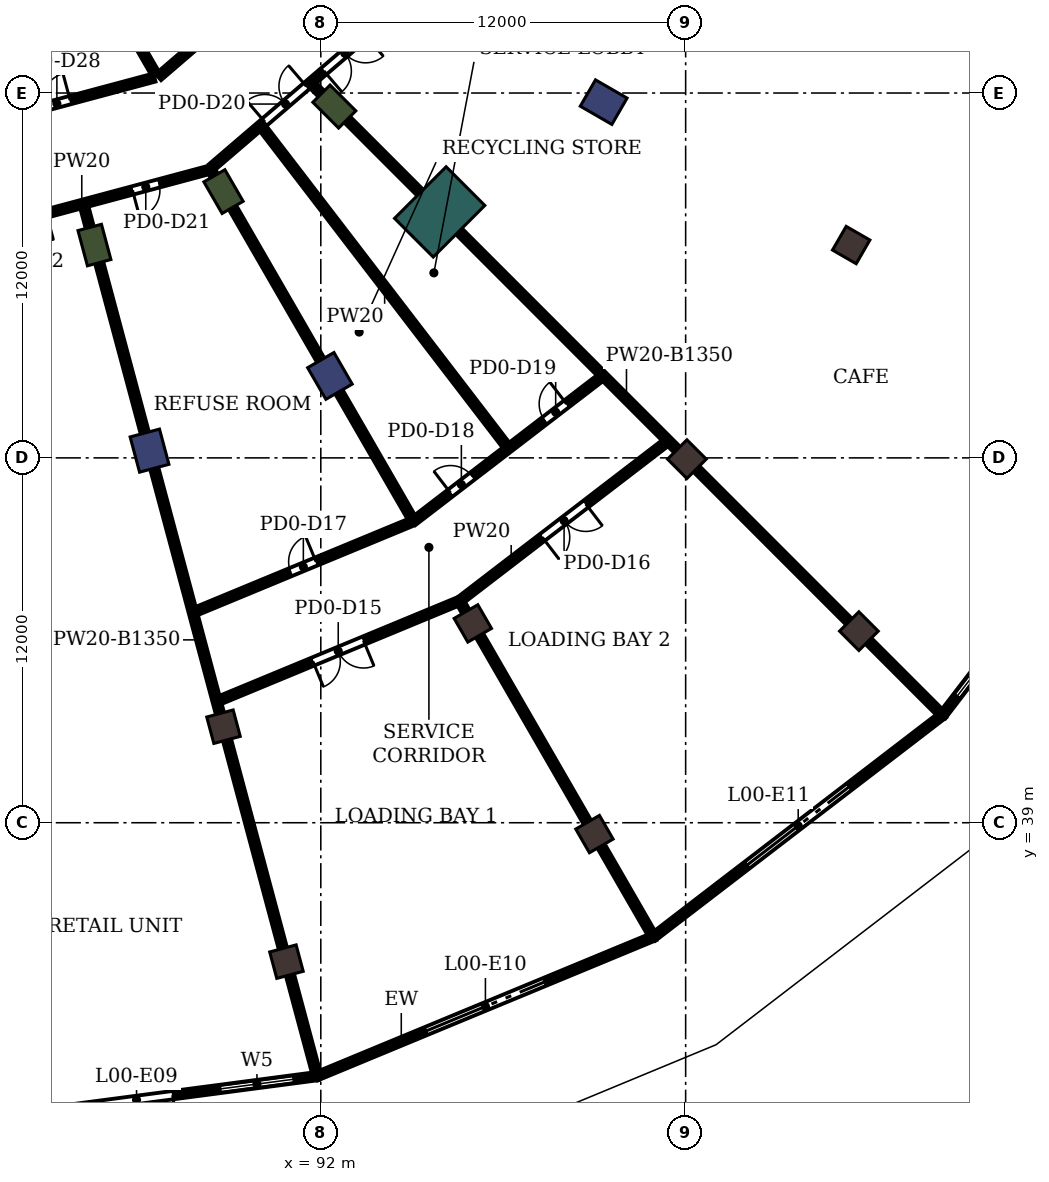
"""IFC4 building model, lengths in metres.
Left out: names, types, materials, properties, quantities, classifications, styles, units other than length and angle.
Written with IfcOpenShell. Run it as: python <this file> out.ifc"""

import sys

from ifc_helpers import new_model, si_unit, direction, frame, frame_2d, origin, origin_2d, place, context, subcontext, project, spatial, rectangle, extrude, element, fill, save


model = new_model("IFC4")
c1 = context("Model", 3, precision=1e-05, world=origin(), true_north=direction((0.0, 1.0)))
c2 = subcontext(c1, "Body", "Model", "MODEL_VIEW")
j1 = project(units=[si_unit("LENGTHUNIT", "METRE"), si_unit("PLANEANGLEUNIT", "RADIAN")], contexts=[c1])
p1 = place(None, origin())
s1 = spatial("IfcSite", under=j1, at=p1, CompositionType="ELEMENT")
p2 = place(p1, origin())
s2 = spatial("IfcBuilding", under=s1, at=p2, CompositionType="ELEMENT")
p3 = place(p2, origin())
s3 = spatial("IfcBuildingStorey", under=s2, at=p3, CompositionType="ELEMENT", Elevation=0.0)
for number, where, z_axis, x_axis in (
    (1, (90.87, 34.431, 0.0), (0.0, 0.0, 1.0), (0.259, -0.966, 0.0)),
    (2, (101.0, 38.627, 0.0), (0.0, 0.0, 1.0), (0.5, -0.866, 0.0)),
    (3, (109.698, 45.302, 0.0), (0.0, 0.0, 1.0), (0.707, -0.707, 0.0)),
    (4, (88.8, 42.158, 0.0), (0.0, 0.0, 1.0), (0.259, -0.966, 0.0)),
    (5, (97.0, 45.555, 0.0), (0.0, 0.0, 1.0), (0.5, -0.866, 0.0)),
    (6, (104.042, 50.958, 0.0), (0.0, 0.0, 1.0), (0.707, -0.707, 0.0)),
    (7, (109.445, 58.0, 0.0), (0.0, 0.0, 1.0), (0.866, -0.5, 0.0)),
):
    element("IfcColumn", number, at=place(p3, frame(where, z_axis=z_axis, x_axis=x_axis)), inside=s3, PredefinedType="COLUMN", context=c2, shape_type="SweptSolid", body=[
        extrude(rectangle(XDim=0.9, YDim=0.9, at=origin_2d()), origin(), (0.0, 0.0, 1.0), 7.0),
    ])
for number, where, z_axis, x_axis in (
    (8, (86.367, 51.238, 0.0), (0.0, 0.0, 1.0), (0.259, -0.966, 0.0)),
    (9, (92.3, 53.696, 0.0), (0.0, 0.0, 1.0), (0.5, -0.866, 0.0)),
    (10, (101.304, 62.7, 0.0), (0.0, 0.0, 1.0), (0.866, -0.5, 0.0)),
):
    element("IfcColumn", number, at=place(p3, frame(where, z_axis=z_axis, x_axis=x_axis)), inside=s3, PredefinedType="COLUMN", context=c2, shape_type="SweptSolid", body=[
        extrude(rectangle(XDim=1.2, YDim=1.0, at=origin_2d()), origin(), (0.0, 0.0, 1.0), 7.0),
    ])
for number, where, z_axis, x_axis in (
    (11, (84.555, 58.0, 0.0), (0.0, 0.0, 1.0), (0.259, -0.966, 0.0)),
    (12, (88.8, 59.758, 0.0), (0.0, 0.0, 1.0), (0.5, -0.866, 0.0)),
    (13, (92.445, 62.555, 0.0), (0.0, 0.0, 1.0), (0.707, -0.707, 0.0)),
):
    element("IfcColumn", number, at=place(p3, frame(where, z_axis=z_axis, x_axis=x_axis)), inside=s3, PredefinedType="COLUMN", context=c2, shape_type="SweptSolid", body=[
        extrude(rectangle(XDim=1.2, YDim=0.8, at=origin_2d()), origin(), (0.0, 0.0, 1.0), 7.0),
    ])
p4 = place(p3, frame((95.91, 59.09, 0.0), z_axis=(0.0, 0.0, 1.0), x_axis=(0.707106781187, -0.707106781187, 0.0)))
e14 = element("IfcColumn", 14, at=p4, inside=s3, PredefinedType="COLUMN", context=c2, shape_type="SweptSolid", body=[
    extrude(rectangle(XDim=1.8, YDim=2.4, at=origin_2d()), origin(), (0.0, 0.0, 1.0), 7.0),
])
p5 = place(p3, frame((80.0, 29.101, 0.0), z_axis=(0.0, 0.0, 1.0), x_axis=(0.991445069361, 0.130524612391, 0.0)))
e15 = element("IfcWall", 15, at=p5, inside=s3, PredefinedType="NOTDEFINED", context=c2, shape_type="SweptSolid", body=[
    extrude(rectangle(XDim=11.982, YDim=0.2, at=frame_2d((5.991, 0.0))), origin(), (0.0, 0.0, 1.0), 7.0),
])
p6 = place(p5, frame((0.797, 0.0, 0.9)))
e16 = element("IfcOpeningElement", 16, at=p6, cuts=e15, PredefinedType="OPENING", context=c2, shape_type="SweptSolid", body=[
    extrude(rectangle(XDim=2.4, YDim=3.6, at=frame_2d((1.2, 1.8))), frame((0.0, 0.11, 0.0), z_axis=(0.0, -1.0, 0.0), x_axis=(1.0, 0.0, 0.0)), (0.0, 0.0, 1.0), 0.22),
])
p7 = place(p5, frame((4.791, 0.0, 0.0)))
e17 = element("IfcOpeningElement", 17, at=p7, cuts=e15, PredefinedType="OPENING", context=c2, shape_type="SweptSolid", body=[
    extrude(rectangle(XDim=2.4, YDim=2.7, at=frame_2d((1.2, 1.35))), frame((0.0, 0.11, 0.0), z_axis=(0.0, -1.0, 0.0), x_axis=(1.0, 0.0, 0.0)), (0.0, 0.0, 1.0), 0.22),
])
p8 = place(p5, frame((8.785, 0.0, 0.9)))
e18 = element("IfcOpeningElement", 18, at=p8, cuts=e15, PredefinedType="OPENING", context=c2, shape_type="SweptSolid", body=[
    extrude(rectangle(XDim=2.4, YDim=3.6, at=frame_2d((1.2, 1.8))), frame((0.0, 0.11, 0.0), z_axis=(0.0, -1.0, 0.0), x_axis=(1.0, 0.0, 0.0)), (0.0, 0.0, 1.0), 0.22),
])
p9 = place(p3, frame((91.88, 30.665, 0.0), z_axis=(0.0, 0.0, 1.0), x_axis=(0.923874283273, 0.382696104901, 0.0)))
e19 = element("IfcWall", 19, at=p9, inside=s3, PredefinedType="NOTDEFINED", context=c2, shape_type="SweptSolid", body=[
    extrude(rectangle(XDim=11.982, YDim=0.2, at=frame_2d((5.991, 0.0))), origin(), (0.0, 0.0, 1.0), 7.0),
])
p10 = place(p9, frame((3.891, 0.0, 0.0)))
e20 = element("IfcOpeningElement", 20, at=p10, cuts=e19, PredefinedType="OPENING", context=c2, shape_type="SweptSolid", body=[
    extrude(rectangle(XDim=4.2, YDim=4.5, at=frame_2d((2.1, 2.25))), frame((0.0, 0.11, 0.0), z_axis=(0.0, -1.0, 0.0), x_axis=(1.0, 0.0, 0.0)), (0.0, 0.0, 1.0), 0.22),
])
p11 = place(p3, frame((102.949, 35.25, 0.0), z_axis=(0.0, 0.0, 1.0), x_axis=(0.793357384068, 0.608756159021, 0.0)))
e21 = element("IfcWall", 21, at=p11, inside=s3, PredefinedType="NOTDEFINED", context=c2, shape_type="SweptSolid", body=[
    extrude(rectangle(XDim=11.982, YDim=0.2, at=frame_2d((5.991, 0.0))), origin(), (0.0, 0.0, 1.0), 7.0),
])
p12 = place(p11, frame((3.891, 0.0, 0.0)))
e22 = element("IfcOpeningElement", 22, at=p12, cuts=e21, PredefinedType="OPENING", context=c2, shape_type="SweptSolid", body=[
    extrude(rectangle(XDim=4.2, YDim=4.5, at=frame_2d((2.1, 2.25))), frame((0.0, 0.11, 0.0), z_axis=(0.0, -1.0, 0.0), x_axis=(1.0, 0.0, 0.0)), (0.0, 0.0, 1.0), 0.22),
])
p13 = place(p3, frame((112.456, 42.544, 0.0), z_axis=(0.0, 0.0, 1.0), x_axis=(0.608756159021, 0.793357384068, 0.0)))
e23 = element("IfcWall", 23, at=p13, inside=s3, PredefinedType="NOTDEFINED", context=c2, shape_type="SweptSolid", body=[
    extrude(rectangle(XDim=11.982, YDim=0.2, at=frame_2d((5.991, 0.0))), origin(), (0.0, 0.0, 1.0), 7.0),
])
p14 = place(p13, frame((0.797, 0.0, 0.9)))
e24 = element("IfcOpeningElement", 24, at=p14, cuts=e23, PredefinedType="OPENING", context=c2, shape_type="SweptSolid", body=[
    extrude(rectangle(XDim=2.4, YDim=3.6, at=frame_2d((1.2, 1.8))), frame((0.0, 0.11, 0.0), z_axis=(0.0, -1.0, 0.0), x_axis=(1.0, 0.0, 0.0)), (0.0, 0.0, 1.0), 0.22),
])
p15 = place(p13, frame((4.791, 0.0, 0.0)))
e25 = element("IfcOpeningElement", 25, at=p15, cuts=e23, PredefinedType="OPENING", context=c2, shape_type="SweptSolid", body=[
    extrude(rectangle(XDim=2.4, YDim=2.7, at=frame_2d((1.2, 1.35))), frame((0.0, 0.11, 0.0), z_axis=(0.0, -1.0, 0.0), x_axis=(1.0, 0.0, 0.0)), (0.0, 0.0, 1.0), 0.22),
])
p16 = place(p13, frame((8.785, 0.0, 0.9)))
e26 = element("IfcOpeningElement", 26, at=p16, cuts=e23, PredefinedType="OPENING", context=c2, shape_type="SweptSolid", body=[
    extrude(rectangle(XDim=2.4, YDim=3.6, at=frame_2d((1.2, 1.8))), frame((0.0, 0.11, 0.0), z_axis=(0.0, -1.0, 0.0), x_axis=(1.0, 0.0, 0.0)), (0.0, 0.0, 1.0), 0.22),
])
p17 = place(p3, frame((80.0, 58.24, 0.0), z_axis=(0.0, 0.0, 1.0), x_axis=(0.965929228495, 0.258806347564, 0.0)))
e27 = element("IfcWall", 27, at=p17, inside=s3, PredefinedType="PARTITIONING", context=c2, shape_type="SweptSolid", body=[
    extrude(rectangle(XDim=8.568, YDim=0.2, at=frame_2d((4.284, 0.0))), origin(), (0.0, 0.0, 1.0), 6.55),
])
p18 = place(p17, frame((6.013, 0.0, 0.0)))
e28 = element("IfcOpeningElement", 28, at=p18, cuts=e27, PredefinedType="OPENING", context=c2, shape_type="SweptSolid", body=[
    extrude(rectangle(XDim=0.9, YDim=2.1, at=frame_2d((0.45, 1.05))), frame((0.0, 0.11, 0.0), z_axis=(0.0, -1.0, 0.0), x_axis=(1.0, 0.0, 0.0)), (0.0, 0.0, 1.0), 0.22),
])
p19 = place(p17, frame((1.279, 0.0, 0.0)))
e29 = element("IfcOpeningElement", 29, at=p19, cuts=e27, PredefinedType="OPENING", context=c2, shape_type="SweptSolid", body=[
    extrude(rectangle(XDim=1.8, YDim=2.1, at=frame_2d((0.9, 1.05))), frame((0.0, 0.11, 0.0), z_axis=(0.0, -1.0, 0.0), x_axis=(1.0, 0.0, 0.0)), (0.0, 0.0, 1.0), 0.22),
])
p20 = place(p3, frame((80.0, 61.76, 0.0), z_axis=(0.0, 0.0, 1.0), x_axis=(0.965932810031, 0.258792980017, 0.0)))
e30 = element("IfcWall", 30, at=p20, inside=s3, PredefinedType="PARTITIONING", context=c2, shape_type="SweptSolid", body=[
    extrude(rectangle(XDim=6.721, YDim=0.2, at=frame_2d((3.36, 0.0))), origin(), (0.0, 0.0, 1.0), 6.55),
])
p21 = place(p20, frame((2.987, 0.0, 0.0)))
e31 = element("IfcOpeningElement", 31, at=p21, cuts=e30, PredefinedType="OPENING", context=c2, shape_type="SweptSolid", body=[
    extrude(rectangle(XDim=0.9, YDim=2.1, at=frame_2d((0.45, 1.05))), frame((0.0, 0.11, 0.0), z_axis=(0.0, -1.0, 0.0), x_axis=(1.0, 0.0, 0.0)), (0.0, 0.0, 1.0), 0.22),
])
p22 = place(p3, frame((83.847, 68.332, 0.0), z_axis=(0.0, 0.0, 1.0), x_axis=(0.499867183387, -0.866102071914, 0.0)))
e32 = element("IfcWall", 32, at=p22, inside=s3, PredefinedType="PARTITIONING", context=c2, shape_type="SweptSolid", body=[
    extrude(rectangle(XDim=5.452, YDim=0.2, at=frame_2d((2.726, 0.0))), origin(), (0.0, 0.0, 1.0), 6.55),
])
p23 = place(p3, frame((84.216, 59.265, 0.0), z_axis=(0.0, 0.0, 1.0), x_axis=(0.258760898943, -0.96594140463, 0.0)))
e33 = element("IfcWall", 33, at=p23, inside=s3, PredefinedType="PARTITIONING", context=c2, shape_type="SweptSolid", body=[
    extrude(rectangle(XDim=29.508, YDim=0.2, at=frame_2d((14.754, 0.0))), origin(), (0.0, 0.0, 1.0), 5.65),
])
p24 = place(p3, frame((86.685, 63.551, 0.0), z_axis=(0.0, 0.0, 1.0), x_axis=(0.758049900748, 0.652196556244, 0.0)))
e34 = element("IfcWall", 34, at=p24, inside=s3, PredefinedType="PARTITIONING", context=c2, shape_type="SweptSolid", body=[
    extrude(rectangle(XDim=4.675, YDim=0.2, at=frame_2d((2.337, 0.0))), origin(), (0.0, 0.0, 1.0), 6.55),
])
p25 = place(p24, frame((1.837, 0.0, 0.0)))
e35 = element("IfcOpeningElement", 35, at=p25, cuts=e34, PredefinedType="OPENING", context=c2, shape_type="SweptSolid", body=[
    extrude(rectangle(XDim=1.0, YDim=2.1, at=frame_2d((0.5, 1.05))), frame((0.0, 0.11, 0.0), z_axis=(0.0, -1.0, 0.0), x_axis=(1.0, 0.0, 0.0)), (0.0, 0.0, 1.0), 0.22),
])
p26 = place(p3, frame((87.896, 45.954, 0.0), z_axis=(0.0, 0.0, 1.0), x_axis=(0.923937266852, 0.382544019587, 0.0)))
e36 = element("IfcWall", 36, at=p26, inside=s3, PredefinedType="PARTITIONING", context=c2, shape_type="SweptSolid", body=[
    extrude(rectangle(XDim=7.628, YDim=0.2, at=frame_2d((3.814, 0.0))), origin(), (0.0, 0.0, 1.0), 6.55),
])
p27 = place(p26, frame((3.371, 0.0, 0.0)))
e37 = element("IfcOpeningElement", 37, at=p27, cuts=e36, PredefinedType="OPENING", context=c2, shape_type="SweptSolid", body=[
    extrude(rectangle(XDim=0.9, YDim=2.1, at=frame_2d((0.45, 1.05))), frame((0.0, 0.11, 0.0), z_axis=(0.0, -1.0, 0.0), x_axis=(1.0, 0.0, 0.0)), (0.0, 0.0, 1.0), 0.22),
])
p28 = place(p3, frame((88.434, 60.575, 0.0), z_axis=(0.0, 0.0, 1.0), x_axis=(0.759266619151, 0.650779687024, 0.0)))
e38 = element("IfcWall", 38, at=p28, inside=s3, PredefinedType="PARTITIONING", context=c2, shape_type="SweptSolid", body=[
    extrude(rectangle(XDim=6.882, YDim=0.2, at=frame_2d((3.441, 0.0))), origin(), (0.0, 0.0, 1.0), 6.55),
])
p29 = place(p28, frame((4.835, 0.0, 0.0)))
e39 = element("IfcOpeningElement", 39, at=p29, cuts=e38, PredefinedType="OPENING", context=c2, shape_type="SweptSolid", body=[
    extrude(rectangle(XDim=1.8, YDim=2.1, at=frame_2d((0.9, 1.05))), frame((0.0, 0.11, 0.0), z_axis=(0.0, -1.0, 0.0), x_axis=(1.0, 0.0, 0.0)), (0.0, 0.0, 1.0), 0.22),
])
p30 = place(p28, frame((2.269, 0.0, 0.0)))
e40 = element("IfcOpeningElement", 40, at=p30, cuts=e38, PredefinedType="OPENING", context=c2, shape_type="SweptSolid", body=[
    extrude(rectangle(XDim=1.8, YDim=2.1, at=frame_2d((0.9, 1.05))), frame((0.0, 0.11, 0.0), z_axis=(0.0, -1.0, 0.0), x_axis=(1.0, 0.0, 0.0)), (0.0, 0.0, 1.0), 0.22),
])
p31 = place(p3, frame((88.362, 60.509, 0.0), z_axis=(0.0, 0.0, 1.0), x_axis=(0.499842399886, -0.866116375134, 0.0)))
e41 = element("IfcWall", 41, at=p31, inside=s3, PredefinedType="PARTITIONING", context=c2, shape_type="SweptSolid", body=[
    extrude(rectangle(XDim=13.274, YDim=0.2, at=frame_2d((6.637, 0.0))), origin(), (0.0, 0.0, 1.0), 5.65),
])
p32 = place(p3, frame((88.679, 43.031, 0.0), z_axis=(0.0, 0.0, 1.0), x_axis=(0.923882727898, 0.382675717927, 0.0)))
e42 = element("IfcWall", 42, at=p32, inside=s3, PredefinedType="PARTITIONING", context=c2, shape_type="SweptSolid", body=[
    extrude(rectangle(XDim=8.432, YDim=0.2, at=frame_2d((4.216, 0.0))), origin(), (0.0, 0.0, 1.0), 6.55),
])
p33 = place(p32, frame((3.316, 0.0, 0.0)))
e43 = element("IfcOpeningElement", 43, at=p33, cuts=e42, PredefinedType="OPENING", context=c2, shape_type="SweptSolid", body=[
    extrude(rectangle(XDim=1.8, YDim=2.1, at=frame_2d((0.9, 1.05))), frame((0.0, 0.11, 0.0), z_axis=(0.0, -1.0, 0.0), x_axis=(1.0, 0.0, 0.0)), (0.0, 0.0, 1.0), 0.22),
])
p34 = place(p3, frame((90.088, 61.849, 0.0), z_axis=(0.0, 0.0, 1.0), x_axis=(0.608726617775, -0.793380050677, 0.0)))
e44 = element("IfcWall", 44, at=p34, inside=s3, PredefinedType="PARTITIONING", context=c2, shape_type="SweptSolid", body=[
    extrude(rectangle(XDim=13.182, YDim=0.2, at=frame_2d((6.591, 0.0))), origin(), (0.0, 0.0, 1.0), 6.55),
])
p35 = place(p3, frame((91.732, 63.263, 0.0), z_axis=(0.0, 0.0, 1.0), x_axis=(0.706939557171, -0.707273965665, 0.0)))
e45 = element("IfcWall", 45, at=p35, inside=s3, PredefinedType="PARTITIONING", context=c2, shape_type="SweptSolid", body=[
    extrude(rectangle(XDim=29.203, YDim=0.2, at=frame_2d((14.601, 0.0))), origin(), (0.0, 0.0, 1.0), 5.65),
])
p36 = place(p3, frame((95.058, 48.92, 0.0), z_axis=(0.0, 0.0, 1.0), x_axis=(0.793254408542, 0.608890337687, 0.0)))
e46 = element("IfcWall", 46, at=p36, inside=s3, PredefinedType="PARTITIONING", context=c2, shape_type="SweptSolid", body=[
    extrude(rectangle(XDim=7.74, YDim=0.2, at=frame_2d((3.87, 0.0))), origin(), (0.0, 0.0, 1.0), 6.55),
])
p37 = place(p36, frame((1.523, 0.0, 0.0)))
e47 = element("IfcOpeningElement", 47, at=p37, cuts=e46, PredefinedType="OPENING", context=c2, shape_type="SweptSolid", body=[
    extrude(rectangle(XDim=0.9, YDim=2.1, at=frame_2d((0.45, 1.05))), frame((0.0, 0.11, 0.0), z_axis=(0.0, -1.0, 0.0), x_axis=(1.0, 0.0, 0.0)), (0.0, 0.0, 1.0), 0.22),
])
p38 = place(p36, frame((5.434, 0.0, 0.0)))
e48 = element("IfcOpeningElement", 48, at=p38, cuts=e46, PredefinedType="OPENING", context=c2, shape_type="SweptSolid", body=[
    extrude(rectangle(XDim=0.9, YDim=2.1, at=frame_2d((0.45, 1.05))), frame((0.0, 0.11, 0.0), z_axis=(0.0, -1.0, 0.0), x_axis=(1.0, 0.0, 0.0)), (0.0, 0.0, 1.0), 0.22),
])
p39 = place(p3, frame((96.614, 46.21, 0.0), z_axis=(0.0, 0.0, 1.0), x_axis=(0.499854846894, -0.866109191752, 0.0)))
e49 = element("IfcWall", 49, at=p39, inside=s3, PredefinedType="PARTITIONING", context=c2, shape_type="SweptSolid", body=[
    extrude(rectangle(XDim=12.558, YDim=0.2, at=frame_2d((6.279, 0.0))), origin(), (0.0, 0.0, 1.0), 5.65),
])
p40 = place(p3, frame((96.57, 46.3, 0.0), z_axis=(0.0, 0.0, 1.0), x_axis=(0.793368149713, 0.608742128509, 0.0)))
e50 = element("IfcWall", 50, at=p40, inside=s3, PredefinedType="PARTITIONING", context=c2, shape_type="SweptSolid", body=[
    extrude(rectangle(XDim=8.531, YDim=0.2, at=frame_2d((4.265, 0.0))), origin(), (0.0, 0.0, 1.0), 6.55),
])
p41 = place(p40, frame((3.425, 0.0, 0.0)))
e51 = element("IfcOpeningElement", 51, at=p41, cuts=e50, PredefinedType="OPENING", context=c2, shape_type="SweptSolid", body=[
    extrude(rectangle(XDim=1.8, YDim=2.1, at=frame_2d((0.9, 1.05))), frame((0.0, 0.11, 0.0), z_axis=(0.0, -1.0, 0.0), x_axis=(1.0, 0.0, 0.0)), (0.0, 0.0, 1.0), 0.22),
])
p42 = place(p7, frame((2.4, 0.0, 0.0), z_axis=(0.0, 0.0, 1.0), x_axis=(-1.0, 0.0, 0.0)))
e52 = element("IfcDoor", 52, at=p42, inside=s3, OperationType="DOUBLE_DOOR_SINGLE_SWING", PredefinedType="DOOR", context=c2, shape_type="SweptSolid", body=[
    extrude(rectangle(XDim=2.4, YDim=2.7, at=frame_2d((1.2, 1.35))), frame((0.0, 0.025, 0.0), z_axis=(0.0, -1.0, 0.0), x_axis=(1.0, 0.0, 0.0)), (0.0, 0.0, 1.0), 0.05),
])
fill(e17, e52)
p43 = place(p8, origin())
e53 = element("IfcWindow", 53, at=p43, inside=s3, PartitioningType="SINGLE_PANEL", PredefinedType="WINDOW", context=c2, shape_type="SweptSolid", body=[
    extrude(rectangle(XDim=2.4, YDim=3.6, at=frame_2d((1.2, 1.8))), frame((0.0, 0.03, 0.0), z_axis=(0.0, -1.0, 0.0), x_axis=(1.0, 0.0, 0.0)), (0.0, 0.0, 1.0), 0.06),
])
fill(e18, e53)
p44 = place(p10, origin())
e54 = element("IfcDoor", 54, at=p44, inside=s3, OperationType="ROLLINGUP", PredefinedType="DOOR", context=c2, shape_type="SweptSolid", body=[
    extrude(rectangle(XDim=4.2, YDim=4.5, at=frame_2d((2.1, 2.25))), frame((0.0, 0.025, 0.0), z_axis=(0.0, -1.0, 0.0), x_axis=(1.0, 0.0, 0.0)), (0.0, 0.0, 1.0), 0.05),
])
fill(e20, e54)
p45 = place(p12, origin())
e55 = element("IfcDoor", 55, at=p45, inside=s3, OperationType="ROLLINGUP", PredefinedType="DOOR", context=c2, shape_type="SweptSolid", body=[
    extrude(rectangle(XDim=4.2, YDim=4.5, at=frame_2d((2.1, 2.25))), frame((0.0, 0.025, 0.0), z_axis=(0.0, -1.0, 0.0), x_axis=(1.0, 0.0, 0.0)), (0.0, 0.0, 1.0), 0.05),
])
fill(e22, e55)
p46 = place(p14, origin())
e56 = element("IfcWindow", 56, at=p46, inside=s3, PartitioningType="SINGLE_PANEL", PredefinedType="WINDOW", context=c2, shape_type="SweptSolid", body=[
    extrude(rectangle(XDim=2.4, YDim=3.6, at=frame_2d((1.2, 1.8))), frame((0.0, 0.03, 0.0), z_axis=(0.0, -1.0, 0.0), x_axis=(1.0, 0.0, 0.0)), (0.0, 0.0, 1.0), 0.06),
])
fill(e24, e56)
p47 = place(p29, frame((1.8, 0.0, 0.0), z_axis=(0.0, 0.0, 1.0), x_axis=(-1.0, 0.0, 0.0)))
e57 = element("IfcDoor", 57, at=p47, inside=s3, OperationType="DOUBLE_DOOR_SINGLE_SWING", PredefinedType="DOOR", context=c2, shape_type="SweptSolid", body=[
    extrude(rectangle(XDim=1.8, YDim=2.1, at=frame_2d((0.9, 1.05))), frame((0.0, 0.025, 0.0), z_axis=(0.0, -1.0, 0.0), x_axis=(1.0, 0.0, 0.0)), (0.0, 0.0, 1.0), 0.05),
])
fill(e39, e57)
p48 = place(p33, frame((1.8, 0.0, 0.0), z_axis=(0.0, 0.0, 1.0), x_axis=(-1.0, 0.0, 0.0)))
e58 = element("IfcDoor", 58, at=p48, inside=s3, OperationType="DOUBLE_DOOR_SINGLE_SWING", PredefinedType="DOOR", context=c2, shape_type="SweptSolid", body=[
    extrude(rectangle(XDim=1.8, YDim=2.1, at=frame_2d((0.9, 1.05))), frame((0.0, 0.025, 0.0), z_axis=(0.0, -1.0, 0.0), x_axis=(1.0, 0.0, 0.0)), (0.0, 0.0, 1.0), 0.05),
])
fill(e43, e58)
p49 = place(p41, frame((1.8, 0.0, 0.0), z_axis=(0.0, 0.0, 1.0), x_axis=(-1.0, 0.0, 0.0)))
e59 = element("IfcDoor", 59, at=p49, inside=s3, OperationType="DOUBLE_DOOR_SINGLE_SWING", PredefinedType="DOOR", context=c2, shape_type="SweptSolid", body=[
    extrude(rectangle(XDim=1.8, YDim=2.1, at=frame_2d((0.9, 1.05))), frame((0.0, 0.025, 0.0), z_axis=(0.0, -1.0, 0.0), x_axis=(1.0, 0.0, 0.0)), (0.0, 0.0, 1.0), 0.05),
])
fill(e51, e59)
p50 = place(p27, origin())
e60 = element("IfcDoor", 60, at=p50, inside=s3, OperationType="SINGLE_SWING_RIGHT", PredefinedType="DOOR", context=c2, shape_type="SweptSolid", body=[
    extrude(rectangle(XDim=0.9, YDim=2.1, at=frame_2d((0.45, 1.05))), frame((0.0, 0.025, 0.0), z_axis=(0.0, -1.0, 0.0), x_axis=(1.0, 0.0, 0.0)), (0.0, 0.0, 1.0), 0.05),
])
fill(e37, e60)
p51 = place(p37, origin())
e61 = element("IfcDoor", 61, at=p51, inside=s3, OperationType="SINGLE_SWING_LEFT", PredefinedType="DOOR", context=c2, shape_type="SweptSolid", body=[
    extrude(rectangle(XDim=0.9, YDim=2.1, at=frame_2d((0.45, 1.05))), frame((0.0, 0.025, 0.0), z_axis=(0.0, -1.0, 0.0), x_axis=(1.0, 0.0, 0.0)), (0.0, 0.0, 1.0), 0.05),
])
fill(e47, e61)
p52 = place(p38, origin())
e62 = element("IfcDoor", 62, at=p52, inside=s3, OperationType="SINGLE_SWING_RIGHT", PredefinedType="DOOR", context=c2, shape_type="SweptSolid", body=[
    extrude(rectangle(XDim=0.9, YDim=2.1, at=frame_2d((0.45, 1.05))), frame((0.0, 0.025, 0.0), z_axis=(0.0, -1.0, 0.0), x_axis=(1.0, 0.0, 0.0)), (0.0, 0.0, 1.0), 0.05),
])
fill(e48, e62)
p53 = place(p30, origin())
e63 = element("IfcDoor", 63, at=p53, inside=s3, OperationType="DOUBLE_DOOR_SINGLE_SWING", PredefinedType="DOOR", context=c2, shape_type="SweptSolid", body=[
    extrude(rectangle(XDim=1.8, YDim=2.1, at=frame_2d((0.9, 1.05))), frame((0.0, 0.025, 0.0), z_axis=(0.0, -1.0, 0.0), x_axis=(1.0, 0.0, 0.0)), (0.0, 0.0, 1.0), 0.05),
])
fill(e40, e63)
p54 = place(p18, frame((0.9, 0.0, 0.0), z_axis=(0.0, 0.0, 1.0), x_axis=(-1.0, 0.0, 0.0)))
e64 = element("IfcDoor", 64, at=p54, inside=s3, OperationType="SINGLE_SWING_RIGHT", PredefinedType="DOOR", context=c2, shape_type="SweptSolid", body=[
    extrude(rectangle(XDim=0.9, YDim=2.1, at=frame_2d((0.45, 1.05))), frame((0.0, 0.025, 0.0), z_axis=(0.0, -1.0, 0.0), x_axis=(1.0, 0.0, 0.0)), (0.0, 0.0, 1.0), 0.05),
])
fill(e28, e64)
p55 = place(p21, origin())
e65 = element("IfcDoor", 65, at=p55, inside=s3, OperationType="SINGLE_SWING_RIGHT", PredefinedType="DOOR", context=c2, shape_type="SweptSolid", body=[
    extrude(rectangle(XDim=0.9, YDim=2.1, at=frame_2d((0.45, 1.05))), frame((0.0, 0.025, 0.0), z_axis=(0.0, -1.0, 0.0), x_axis=(1.0, 0.0, 0.0)), (0.0, 0.0, 1.0), 0.05),
])
fill(e31, e65)
save(model, sys.argv[1])
